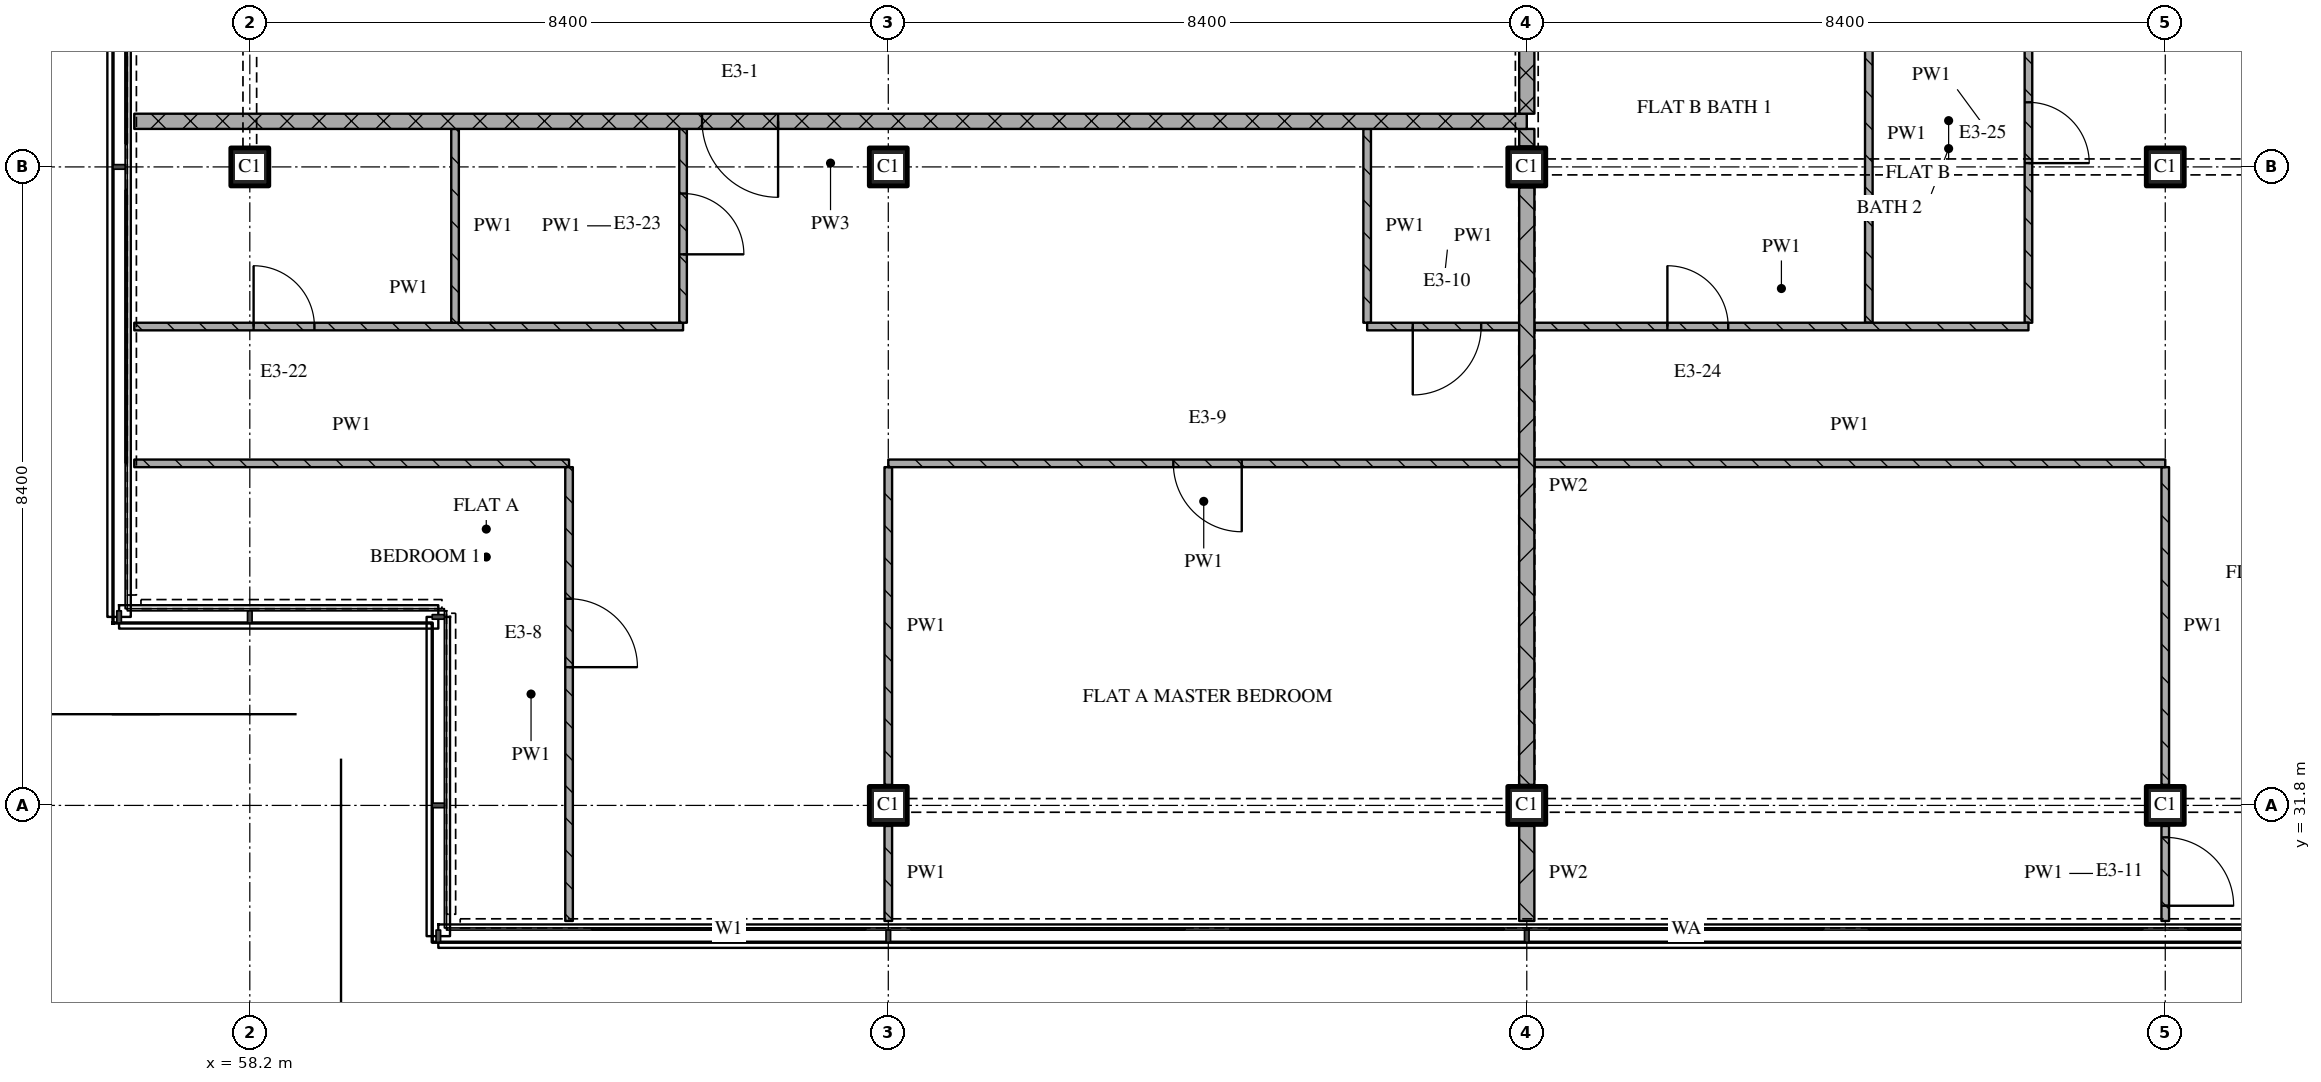
"""IFC4 building model, lengths in metres.
Left out: names, types, materials, properties, quantities, classifications, styles, units other than length and angle.
Written with IfcOpenShell. Run it as: python <this file> out.ifc"""

import sys

from ifc_helpers import new_model, si_unit, direction, frame, frame_2d, origin, origin_2d, place, context, subcontext, project, spatial, rectangle, extrude, element, fill, save


model = new_model("IFC4")
c1 = context("Model", 3, precision=1e-05, world=origin(), true_north=direction((0.0, 1.0)))
c2 = subcontext(c1, "Body", "Model", "MODEL_VIEW")
j1 = project(units=[si_unit("LENGTHUNIT", "METRE"), si_unit("PLANEANGLEUNIT", "RADIAN")], contexts=[c1])
p1 = place(None, origin())
s1 = spatial("IfcSite", under=j1, at=p1, CompositionType="ELEMENT")
p2 = place(p1, origin())
s2 = spatial("IfcBuilding", under=s1, at=p2, CompositionType="ELEMENT")
p3 = place(p2, frame((0.0, 0.0, 274.35)))
s3 = spatial("IfcBuildingStorey", under=s2, at=p3, CompositionType="ELEMENT", Elevation=274.35)
for number, where, z_axis, x_axis in (
    (1, (58.2, 40.2, 0.0), (0.0, 0.0, 1.0), (1.0, 0.0, 0.0)),
    (2, (66.6, 31.8, 0.0), (0.0, 0.0, 1.0), (1.0, 0.0, 0.0)),
    (3, (66.6, 40.2, 0.0), (0.0, 0.0, 1.0), (1.0, 0.0, 0.0)),
    (4, (75.0, 31.8, 0.0), (0.0, 0.0, 1.0), (1.0, 0.0, 0.0)),
    (5, (75.0, 40.2, 0.0), (0.0, 0.0, 1.0), (1.0, 0.0, 0.0)),
    (6, (83.4, 31.8, 0.0), (0.0, 0.0, 1.0), (1.0, 0.0, 0.0)),
    (7, (83.4, 40.2, 0.0), (0.0, 0.0, 1.0), (1.0, 0.0, 0.0)),
):
    element("IfcColumn", number, at=place(p3, frame(where, z_axis=z_axis, x_axis=x_axis)), inside=s3, PredefinedType="COLUMN", context=c2, shape_type="SweptSolid", body=[
        extrude(rectangle(XDim=0.5, YDim=0.5, at=origin_2d()), origin(), (0.0, 0.0, 1.0), 3.6),
    ])
p4 = place(p3, frame((56.68, 36.3, 0.0), z_axis=(0.0, 0.0, 1.0), x_axis=(1.0, 0.0, 0.0)))
e8 = element("IfcWall", 8, at=p4, inside=s3, PredefinedType="PARTITIONING", context=c2, shape_type="SweptSolid", body=[
    extrude(rectangle(XDim=5.72, YDim=0.1, at=frame_2d((2.86, 0.0))), origin(), (0.0, 0.0, 1.0), 3.32),
])
p5 = place(p3, frame((56.68, 38.1, 0.0), z_axis=(0.0, 0.0, 1.0), x_axis=(1.0, 0.0, 0.0)))
e9 = element("IfcWall", 9, at=p5, inside=s3, PredefinedType="PARTITIONING", context=c2, shape_type="SweptSolid", body=[
    extrude(rectangle(XDim=7.22, YDim=0.1, at=frame_2d((3.61, 0.0))), origin(), (0.0, 0.0, 1.0), 3.32),
])
p6 = place(p5, frame((1.57, 0.0, 0.0)))
e10 = element("IfcOpeningElement", 10, at=p6, cuts=e9, PredefinedType="OPENING", context=c2, shape_type="SweptSolid", body=[
    extrude(rectangle(XDim=0.8, YDim=2.1, at=frame_2d((0.4, 1.05))), frame((0.0, 0.06, 0.0), z_axis=(0.0, -1.0, 0.0), x_axis=(1.0, 0.0, 0.0)), (0.0, 0.0, 1.0), 0.12),
])
p7 = place(p3, frame((75.0, 40.8, 0.0), z_axis=(0.0, 0.0, 1.0), x_axis=(-1.0, 0.0, 0.0)))
e11 = element("IfcWall", 11, at=p7, inside=s3, PredefinedType="PARTITIONING", context=c2, shape_type="SweptSolid", body=[
    extrude(rectangle(XDim=18.32, YDim=0.2, at=frame_2d((9.16, 0.0))), origin(), (0.0, 0.0, 1.0), 3.32),
])
p8 = place(p7, frame((9.85, 0.0, 0.0)))
e12 = element("IfcOpeningElement", 12, at=p8, cuts=e11, PredefinedType="OPENING", context=c2, shape_type="SweptSolid", body=[
    extrude(rectangle(XDim=1.0, YDim=2.1, at=frame_2d((0.5, 1.05))), frame((0.0, 0.11, 0.0), z_axis=(0.0, -1.0, 0.0), x_axis=(1.0, 0.0, 0.0)), (0.0, 0.0, 1.0), 0.22),
])
p9 = place(p3, frame((60.9, 40.7, 0.0), z_axis=(0.0, 0.0, 1.0), x_axis=(0.0, -1.0, 0.0)))
e13 = element("IfcWall", 13, at=p9, inside=s3, PredefinedType="PARTITIONING", context=c2, shape_type="SweptSolid", body=[
    extrude(rectangle(XDim=2.55, YDim=0.1, at=frame_2d((1.275, 0.0))), origin(), (0.0, 0.0, 1.0), 3.32),
])
p10 = place(p3, frame((62.4, 30.28, 0.0), z_axis=(0.0, 0.0, 1.0), x_axis=(0.0, 1.0, 0.0)))
e14 = element("IfcWall", 14, at=p10, inside=s3, PredefinedType="PARTITIONING", context=c2, shape_type="SweptSolid", body=[
    extrude(rectangle(XDim=5.97, YDim=0.1, at=frame_2d((2.985, 0.0))), origin(), (0.0, 0.0, 1.0), 3.32),
])
p11 = place(p10, frame((3.339, 0.0, 0.0)))
e15 = element("IfcOpeningElement", 15, at=p11, cuts=e14, PredefinedType="OPENING", context=c2, shape_type="SweptSolid", body=[
    extrude(rectangle(XDim=0.9, YDim=2.1, at=frame_2d((0.45, 1.05))), frame((0.0, 0.06, 0.0), z_axis=(0.0, -1.0, 0.0), x_axis=(1.0, 0.0, 0.0)), (0.0, 0.0, 1.0), 0.12),
])
p12 = place(p3, frame((63.9, 38.15, 0.0), z_axis=(0.0, 0.0, 1.0), x_axis=(0.0, 1.0, 0.0)))
e16 = element("IfcWall", 16, at=p12, inside=s3, PredefinedType="PARTITIONING", context=c2, shape_type="SweptSolid", body=[
    extrude(rectangle(XDim=2.55, YDim=0.1, at=frame_2d((1.275, 0.0))), origin(), (0.0, 0.0, 1.0), 3.32),
])
p13 = place(p12, frame((0.9, 0.0, 0.0)))
e17 = element("IfcOpeningElement", 17, at=p13, cuts=e16, PredefinedType="OPENING", context=c2, shape_type="SweptSolid", body=[
    extrude(rectangle(XDim=0.8, YDim=2.1, at=frame_2d((0.4, 1.05))), frame((0.0, 0.06, 0.0), z_axis=(0.0, -1.0, 0.0), x_axis=(1.0, 0.0, 0.0)), (0.0, 0.0, 1.0), 0.12),
])
p14 = place(p3, frame((66.6, 31.53, 0.0), z_axis=(0.0, 0.0, 1.0), x_axis=(0.0, -1.0, 0.0)))
e18 = element("IfcWall", 18, at=p14, inside=s3, PredefinedType="PARTITIONING", context=c2, shape_type="SweptSolid", body=[
    extrude(rectangle(XDim=1.25, YDim=0.1, at=frame_2d((0.625, 0.0))), origin(), (0.0, 0.0, 1.0), 3.32),
])
p15 = place(p3, frame((66.6, 36.25, 0.0), z_axis=(0.0, 0.0, 1.0), x_axis=(0.0, -1.0, 0.0)))
e19 = element("IfcWall", 19, at=p15, inside=s3, PredefinedType="PARTITIONING", context=c2, shape_type="SweptSolid", body=[
    extrude(rectangle(XDim=4.18, YDim=0.1, at=frame_2d((2.09, 0.0))), origin(), (0.0, 0.0, 1.0), 3.32),
])
p16 = place(p3, frame((72.9, 40.7, 0.0), z_axis=(0.0, 0.0, 1.0), x_axis=(0.0, -1.0, 0.0)))
e20 = element("IfcWall", 20, at=p16, inside=s3, PredefinedType="PARTITIONING", context=c2, shape_type="SweptSolid", body=[
    extrude(rectangle(XDim=2.55, YDim=0.1, at=frame_2d((1.275, 0.0))), origin(), (0.0, 0.0, 1.0), 3.32),
])
p17 = place(p3, frame((75.0, 43.1, 0.0), z_axis=(0.0, 0.0, 1.0), x_axis=(0.0, -1.0, 0.0)))
e21 = element("IfcWall", 21, at=p17, inside=s3, PredefinedType="PARTITIONING", context=c2, shape_type="SweptSolid", body=[
    extrude(rectangle(XDim=2.2, YDim=0.2, at=frame_2d((1.1, 0.0))), origin(), (0.0, 0.0, 1.0), 2.53),
])
p18 = place(p3, frame((75.0, 31.53, 0.0), z_axis=(0.0, 0.0, 1.0), x_axis=(0.0, -1.0, 0.0)))
e22 = element("IfcWall", 22, at=p18, inside=s3, PredefinedType="PARTITIONING", context=c2, shape_type="SweptSolid", body=[
    extrude(rectangle(XDim=1.25, YDim=0.2, at=frame_2d((0.625, 0.0))), origin(), (0.0, 0.0, 1.0), 3.32),
])
p19 = place(p3, frame((75.0, 39.93, 0.0), z_axis=(0.0, 0.0, 1.0), x_axis=(0.0, -1.0, 0.0)))
e23 = element("IfcWall", 23, at=p19, inside=s3, PredefinedType="PARTITIONING", context=c2, shape_type="SweptSolid", body=[
    extrude(rectangle(XDim=7.86, YDim=0.2, at=frame_2d((3.93, 0.0))), origin(), (0.0, 0.0, 1.0), 2.77),
])
p20 = place(p3, frame((75.0, 40.7, 0.0), z_axis=(0.0, 0.0, 1.0), x_axis=(0.0, -1.0, 0.0)))
e24 = element("IfcWall", 24, at=p20, inside=s3, PredefinedType="PARTITIONING", context=c2, shape_type="SweptSolid", body=[
    extrude(rectangle(XDim=0.23, YDim=0.2, at=frame_2d((0.115, 0.0))), origin(), (0.0, 0.0, 1.0), 3.32),
])
p21 = place(p3, frame((79.5, 43.1, 0.0), z_axis=(0.0, 0.0, 1.0), x_axis=(0.0, -1.0, 0.0)))
e25 = element("IfcWall", 25, at=p21, inside=s3, PredefinedType="PARTITIONING", context=c2, shape_type="SweptSolid", body=[
    extrude(rectangle(XDim=4.95, YDim=0.1, at=frame_2d((2.475, 0.0))), origin(), (0.0, 0.0, 1.0), 3.32),
])
p22 = place(p3, frame((81.6, 38.15, 0.0), z_axis=(0.0, 0.0, 1.0), x_axis=(0.0, 1.0, 0.0)))
e26 = element("IfcWall", 26, at=p22, inside=s3, PredefinedType="PARTITIONING", context=c2, shape_type="SweptSolid", body=[
    extrude(rectangle(XDim=4.95, YDim=0.1, at=frame_2d((2.475, 0.0))), origin(), (0.0, 0.0, 1.0), 3.32),
])
p23 = place(p22, frame((2.1, 0.0, 0.0)))
e27 = element("IfcOpeningElement", 27, at=p23, cuts=e26, PredefinedType="OPENING", context=c2, shape_type="SweptSolid", body=[
    extrude(rectangle(XDim=0.8, YDim=2.1, at=frame_2d((0.4, 1.05))), frame((0.0, 0.06, 0.0), z_axis=(0.0, -1.0, 0.0), x_axis=(1.0, 0.0, 0.0)), (0.0, 0.0, 1.0), 0.12),
])
p24 = place(p3, frame((83.4, 30.28, 0.0), z_axis=(0.0, 0.0, 1.0), x_axis=(0.0, 1.0, 0.0)))
e28 = element("IfcWall", 28, at=p24, inside=s3, PredefinedType="PARTITIONING", context=c2, shape_type="SweptSolid", body=[
    extrude(rectangle(XDim=1.25, YDim=0.1, at=frame_2d((0.625, 0.0))), origin(), (0.0, 0.0, 1.0), 3.32),
])
p25 = place(p24, frame((0.2, 0.0, 0.0)))
e29 = element("IfcOpeningElement", 29, at=p25, cuts=e28, PredefinedType="OPENING", context=c2, shape_type="SweptSolid", body=[
    extrude(rectangle(XDim=0.9, YDim=2.1, at=frame_2d((0.45, 1.05))), frame((0.0, 0.06, 0.0), z_axis=(0.0, -1.0, 0.0), x_axis=(1.0, 0.0, 0.0)), (0.0, 0.0, 1.0), 0.12),
])
p26 = place(p3, frame((83.4, 36.25, 0.0), z_axis=(0.0, 0.0, 1.0), x_axis=(0.0, -1.0, 0.0)))
e30 = element("IfcWall", 30, at=p26, inside=s3, PredefinedType="PARTITIONING", context=c2, shape_type="SweptSolid", body=[
    extrude(rectangle(XDim=4.18, YDim=0.1, at=frame_2d((2.09, 0.0))), origin(), (0.0, 0.0, 1.0), 3.32),
])
p27 = place(p3, frame((74.9, 36.3, 0.0), z_axis=(0.0, 0.0, 1.0), x_axis=(-1.0, 0.0, 0.0)))
e31 = element("IfcWall", 31, at=p27, inside=s3, PredefinedType="PARTITIONING", context=c2, shape_type="SweptSolid", body=[
    extrude(rectangle(XDim=8.3, YDim=0.1, at=frame_2d((4.15, 0.0))), origin(), (0.0, 0.0, 1.0), 3.32),
])
p28 = place(p27, frame((3.65, 0.0, 0.0)))
e32 = element("IfcOpeningElement", 32, at=p28, cuts=e31, PredefinedType="OPENING", context=c2, shape_type="SweptSolid", body=[
    extrude(rectangle(XDim=0.9, YDim=2.1, at=frame_2d((0.45, 1.05))), frame((0.0, 0.06, 0.0), z_axis=(0.0, -1.0, 0.0), x_axis=(1.0, 0.0, 0.0)), (0.0, 0.0, 1.0), 0.12),
])
p29 = place(p3, frame((75.1, 36.3, 0.0), z_axis=(0.0, 0.0, 1.0), x_axis=(1.0, 0.0, 0.0)))
e33 = element("IfcWall", 33, at=p29, inside=s3, PredefinedType="PARTITIONING", context=c2, shape_type="SweptSolid", body=[
    extrude(rectangle(XDim=8.3, YDim=0.1, at=frame_2d((4.15, 0.0))), origin(), (0.0, 0.0, 1.0), 3.32),
])
p30 = place(p3, frame((72.9, 38.1, 0.0), z_axis=(0.0, 0.0, 1.0), x_axis=(1.0, 0.0, 0.0)))
e34 = element("IfcWall", 34, at=p30, inside=s3, PredefinedType="PARTITIONING", context=c2, shape_type="SweptSolid", body=[
    extrude(rectangle(XDim=2.0, YDim=0.1, at=frame_2d((1.0, 0.0))), origin(), (0.0, 0.0, 1.0), 3.32),
])
p31 = place(p30, frame((0.6, 0.0, 0.0)))
e35 = element("IfcOpeningElement", 35, at=p31, cuts=e34, PredefinedType="OPENING", context=c2, shape_type="SweptSolid", body=[
    extrude(rectangle(XDim=0.9, YDim=2.1, at=frame_2d((0.45, 1.05))), frame((0.0, 0.06, 0.0), z_axis=(0.0, -1.0, 0.0), x_axis=(1.0, 0.0, 0.0)), (0.0, 0.0, 1.0), 0.12),
])
p32 = place(p3, frame((75.1, 38.1, 0.0), z_axis=(0.0, 0.0, 1.0), x_axis=(1.0, 0.0, 0.0)))
e36 = element("IfcWall", 36, at=p32, inside=s3, PredefinedType="PARTITIONING", context=c2, shape_type="SweptSolid", body=[
    extrude(rectangle(XDim=6.5, YDim=0.1, at=frame_2d((3.25, 0.0))), origin(), (0.0, 0.0, 1.0), 3.32),
])
p33 = place(p32, frame((1.75, 0.0, 0.0)))
e37 = element("IfcOpeningElement", 37, at=p33, cuts=e36, PredefinedType="OPENING", context=c2, shape_type="SweptSolid", body=[
    extrude(rectangle(XDim=0.8, YDim=2.1, at=frame_2d((0.4, 1.05))), frame((0.0, 0.06, 0.0), z_axis=(0.0, -1.0, 0.0), x_axis=(1.0, 0.0, 0.0)), (0.0, 0.0, 1.0), 0.12),
])
p34 = place(p6, origin())
e38 = element("IfcDoor", 38, at=p34, inside=s3, OperationType="SINGLE_SWING_LEFT", PredefinedType="DOOR", context=c2, shape_type="SweptSolid", body=[
    extrude(rectangle(XDim=0.8, YDim=2.1, at=frame_2d((0.4, 1.05))), frame((0.0, 0.025, 0.0), z_axis=(0.0, -1.0, 0.0), x_axis=(1.0, 0.0, 0.0)), (0.0, 0.0, 1.0), 0.05),
])
fill(e10, e38)
p35 = place(p8, origin())
e39 = element("IfcDoor", 39, at=p35, inside=s3, OperationType="SINGLE_SWING_LEFT", PredefinedType="DOOR", context=c2, shape_type="SweptSolid", body=[
    extrude(rectangle(XDim=1.0, YDim=2.1, at=frame_2d((0.5, 1.05))), frame((0.0, 0.025, 0.0), z_axis=(0.0, -1.0, 0.0), x_axis=(1.0, 0.0, 0.0)), (0.0, 0.0, 1.0), 0.05),
])
fill(e12, e39)
p36 = place(p11, origin())
e40 = element("IfcDoor", 40, at=p36, inside=s3, OperationType="SINGLE_SWING_RIGHT", PredefinedType="DOOR", context=c2, shape_type="SweptSolid", body=[
    extrude(rectangle(XDim=0.9, YDim=2.1, at=frame_2d((0.45, 1.05))), frame((0.0, 0.025, 0.0), z_axis=(0.0, -1.0, 0.0), x_axis=(1.0, 0.0, 0.0)), (0.0, 0.0, 1.0), 0.05),
])
fill(e15, e40)
p37 = place(p13, origin())
e41 = element("IfcDoor", 41, at=p37, inside=s3, OperationType="SINGLE_SWING_RIGHT", PredefinedType="DOOR", context=c2, shape_type="SweptSolid", body=[
    extrude(rectangle(XDim=0.8, YDim=2.1, at=frame_2d((0.4, 1.05))), frame((0.0, 0.025, 0.0), z_axis=(0.0, -1.0, 0.0), x_axis=(1.0, 0.0, 0.0)), (0.0, 0.0, 1.0), 0.05),
])
fill(e17, e41)
p38 = place(p23, origin())
e42 = element("IfcDoor", 42, at=p38, inside=s3, OperationType="SINGLE_SWING_RIGHT", PredefinedType="DOOR", context=c2, shape_type="SweptSolid", body=[
    extrude(rectangle(XDim=0.8, YDim=2.1, at=frame_2d((0.4, 1.05))), frame((0.0, 0.025, 0.0), z_axis=(0.0, -1.0, 0.0), x_axis=(1.0, 0.0, 0.0)), (0.0, 0.0, 1.0), 0.05),
])
fill(e27, e42)
p39 = place(p25, origin())
e43 = element("IfcDoor", 43, at=p39, inside=s3, OperationType="SINGLE_SWING_RIGHT", PredefinedType="DOOR", context=c2, shape_type="SweptSolid", body=[
    extrude(rectangle(XDim=0.9, YDim=2.1, at=frame_2d((0.45, 1.05))), frame((0.0, 0.025, 0.0), z_axis=(0.0, -1.0, 0.0), x_axis=(1.0, 0.0, 0.0)), (0.0, 0.0, 1.0), 0.05),
])
fill(e29, e43)
p40 = place(p28, origin())
e44 = element("IfcDoor", 44, at=p40, inside=s3, OperationType="SINGLE_SWING_LEFT", PredefinedType="DOOR", context=c2, shape_type="SweptSolid", body=[
    extrude(rectangle(XDim=0.9, YDim=2.1, at=frame_2d((0.45, 1.05))), frame((0.0, 0.025, 0.0), z_axis=(0.0, -1.0, 0.0), x_axis=(1.0, 0.0, 0.0)), (0.0, 0.0, 1.0), 0.05),
])
fill(e32, e44)
p41 = place(p31, origin())
e45 = element("IfcDoor", 45, at=p41, inside=s3, OperationType="SINGLE_SWING_RIGHT", PredefinedType="DOOR", context=c2, shape_type="SweptSolid", body=[
    extrude(rectangle(XDim=0.9, YDim=2.1, at=frame_2d((0.45, 1.05))), frame((0.0, 0.025, 0.0), z_axis=(0.0, -1.0, 0.0), x_axis=(1.0, 0.0, 0.0)), (0.0, 0.0, 1.0), 0.05),
])
fill(e35, e45)
p42 = place(p33, origin())
e46 = element("IfcDoor", 46, at=p42, inside=s3, OperationType="SINGLE_SWING_LEFT", PredefinedType="DOOR", context=c2, shape_type="SweptSolid", body=[
    extrude(rectangle(XDim=0.8, YDim=2.1, at=frame_2d((0.4, 1.05))), frame((0.0, 0.025, 0.0), z_axis=(0.0, -1.0, 0.0), x_axis=(1.0, 0.0, 0.0)), (0.0, 0.0, 1.0), 0.05),
])
fill(e37, e46)
save(model, sys.argv[1])
